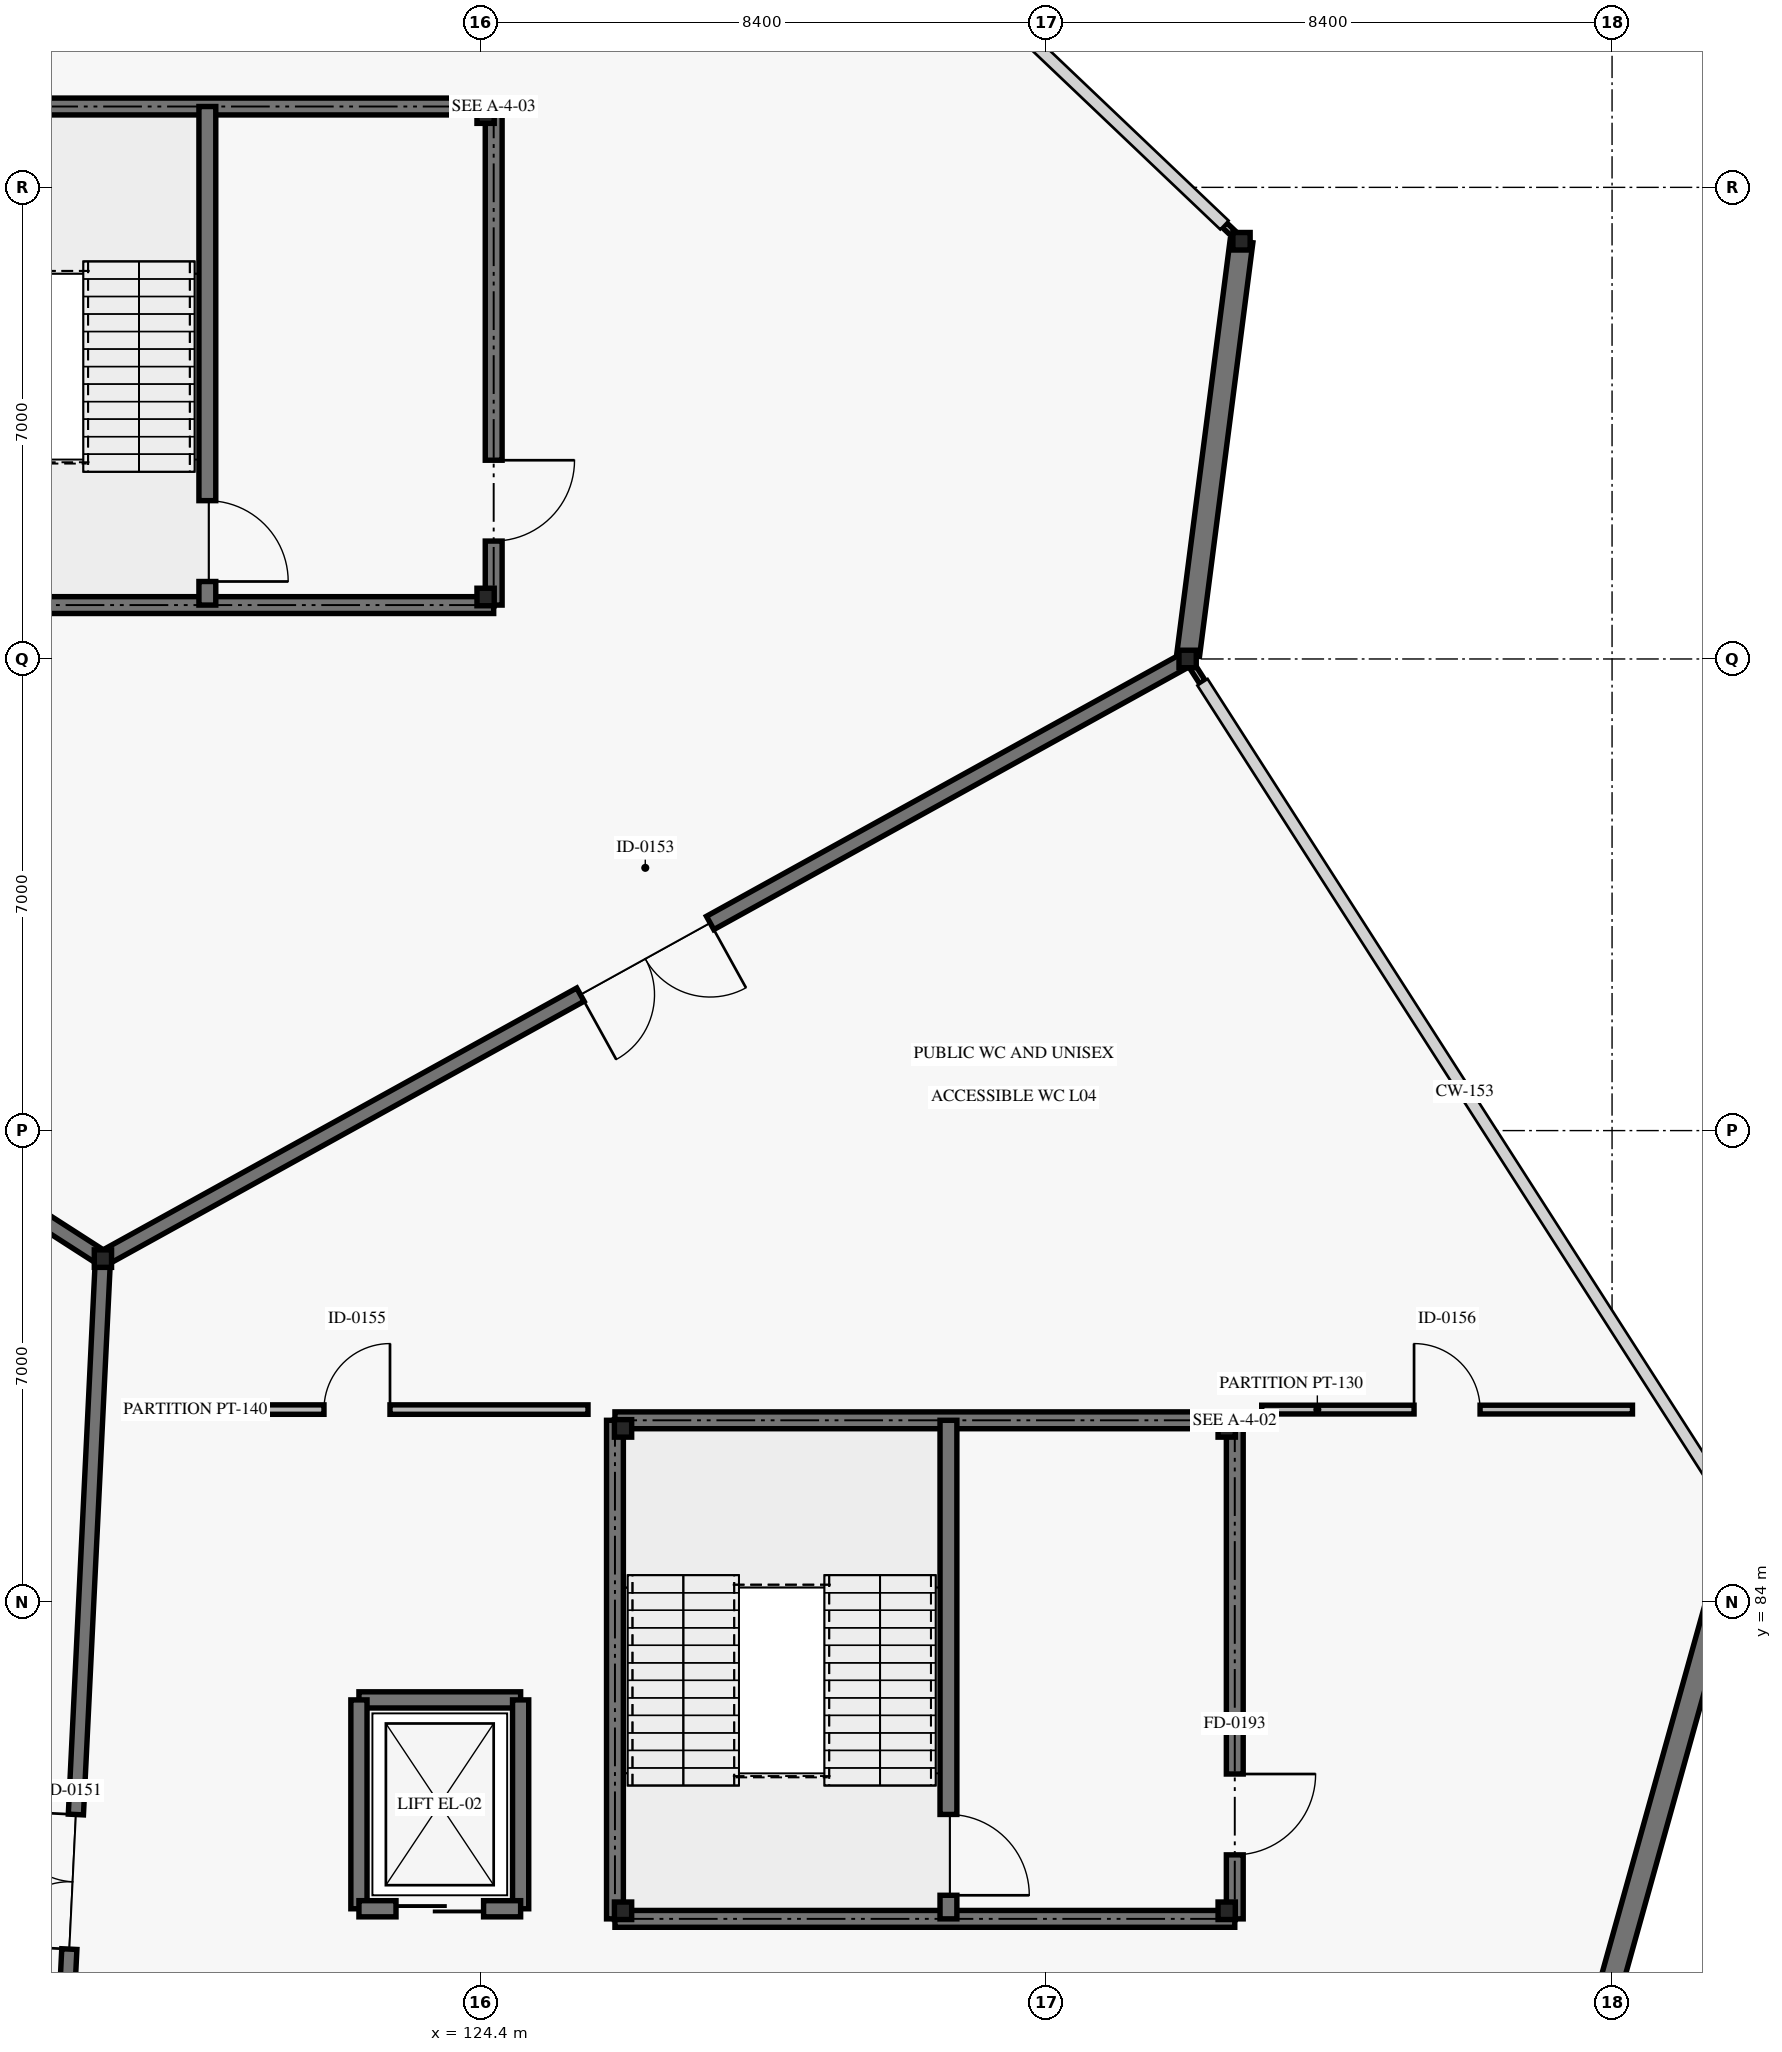
"""IFC4 building model, lengths in metres.
Left out: names, types, materials, properties, quantities, classifications, styles, units other than length and angle.
Written with IfcOpenShell. Run it as: python <this file> out.ifc"""

import sys

from ifc_helpers import new_model, si_unit, direction, frame, frame_2d, origin, origin_2d, place, context, subcontext, project, spatial, rectangle, i_section, extrude, element, fill, save


model = new_model("IFC4")
c1 = context("Model", 3, precision=1e-05, world=origin(), true_north=direction((0.0, 1.0)))
c2 = subcontext(c1, "Body", "Model", "MODEL_VIEW")
j1 = project(units=[si_unit("LENGTHUNIT", "METRE"), si_unit("PLANEANGLEUNIT", "RADIAN")], contexts=[c1])
p1 = place(None, origin())
s1 = spatial("IfcSite", under=j1, at=p1, CompositionType="ELEMENT")
p2 = place(p1, origin())
s2 = spatial("IfcBuilding", under=s1, at=p2, CompositionType="ELEMENT")
p3 = place(p2, frame((0.0, 0.0, 19.8)))
s3 = spatial("IfcBuildingStorey", under=s2, at=p3, CompositionType="ELEMENT", Elevation=19.8)
for number, where, z_axis, x_axis in (
    (1, (118.8, 89.1, 0.0), (0.0, 0.0, 1.0), (1.0, 0.0, 0.0)),
    (2, (134.9, 98.0, 0.0), (0.0, 0.0, 1.0), (1.0, 0.0, 0.0)),
    (3, (135.7, 104.2, 0.0), (0.0, 0.0, 1.0), (1.0, 0.0, 0.0)),
    (4, (126.52, 79.42, 0.0), (0.0, 0.0, 1.0), (1.0, 0.0, 0.0)),
    (5, (135.48, 79.42, 0.0), (0.0, 0.0, 1.0), (1.0, 0.0, 0.0)),
    (6, (135.48, 86.58, 0.0), (0.0, 0.0, 1.0), (1.0, 0.0, 0.0)),
    (7, (126.52, 86.58, 0.0), (0.0, 0.0, 1.0), (1.0, 0.0, 0.0)),
    (8, (124.48, 98.92, 0.0), (0.0, 0.0, 1.0), (1.0, 0.0, 0.0)),
    (9, (124.48, 106.08, 0.0), (0.0, 0.0, 1.0), (1.0, 0.0, 0.0)),
):
    element("IfcColumn", number, at=place(p3, frame(where, z_axis=z_axis, x_axis=x_axis)), inside=s3, PredefinedType="COLUMN", context=c2, shape_type="SweptSolid", body=[
        extrude(i_section(OverallWidth=0.256, OverallDepth=0.26, WebThickness=0.01, FlangeThickness=0.017, FilletRadius=0.013, at=origin_2d()), origin(), (0.0, 0.0, 1.0), 9.0),
    ])
p4 = place(p3, frame((143.1, 85.2, 0.0), z_axis=(0.0, 0.0, 1.0), x_axis=(-0.268807620494, -0.96319388659, 0.0)))
e10 = element("IfcWall", 10, at=p4, inside=s3, PredefinedType="SOLIDWALL", context=c2, shape_type="SweptSolid", body=[
    extrude(rectangle(XDim=13.393, YDim=0.34, at=frame_2d((6.696, 0.0))), origin(), (0.0, 0.0, 1.0), 7.82),
])
p5 = place(p3, frame((134.955, 97.915, 0.0), z_axis=(0.0, 0.0, 1.0), x_axis=(0.538155087301, -0.842845835258, 0.0)))
e11 = element("IfcWall", 11, at=p5, inside=s3, PredefinedType="SOLIDWALL", context=c2, shape_type="SweptSolid", body=[
    extrude(rectangle(XDim=0.309, YDim=0.095, at=frame_2d((0.154, 0.0))), origin(), (0.0, 0.0, 1.0), 7.82),
])
p6 = place(p3, frame((135.7, 104.2, 0.0), z_axis=(0.0, 0.0, 1.0), x_axis=(-0.127911284164, -0.99178561362, 0.0)))
e12 = element("IfcWall", 12, at=p6, inside=s3, PredefinedType="SOLIDWALL", context=c2, shape_type="SweptSolid", body=[
    extrude(rectangle(XDim=6.192, YDim=0.34, at=frame_2d((3.096, 0.0))), origin(), (0.0, 0.0, 1.0), 7.82),
])
p7 = place(p3, frame((135.446, 104.441, 0.0), z_axis=(0.0, 0.0, 1.0), x_axis=(0.726243974232, -0.687437044311, 0.0)))
e13 = element("IfcWall", 13, at=p7, inside=s3, PredefinedType="SOLIDWALL", context=c2, shape_type="SweptSolid", body=[
    extrude(rectangle(XDim=0.308, YDim=0.095, at=frame_2d((0.154, 0.0))), origin(), (0.0, 0.0, 1.0), 7.82),
])
p8 = place(p3, frame((117.9, 70.6, 0.0), z_axis=(0.0, 0.0, 1.0), x_axis=(0.048599072515, 0.998818366947, 0.0)))
e14 = element("IfcWall", 14, at=p8, inside=s3, PredefinedType="SOLIDWALL", context=c2, shape_type="SweptSolid", body=[
    extrude(rectangle(XDim=18.522, YDim=0.225, at=frame_2d((9.261, 0.0))), origin(), (0.0, 0.0, 1.0), 8.22),
])
p9 = place(p8, frame((8.261, 0.0, 0.0)))
e15 = element("IfcOpeningElement", 15, at=p9, cuts=e14, PredefinedType="OPENING", context=c2, shape_type="SweptSolid", body=[
    extrude(rectangle(XDim=2.0, YDim=2.5, at=frame_2d((1.0, 1.25))), frame((0.0, 0.123, 0.0), z_axis=(0.0, -1.0, 0.0), x_axis=(1.0, 0.0, 0.0)), (0.0, 0.0, 1.0), 0.245),
])
p10 = place(p3, frame((118.8, 89.1, 0.0), z_axis=(0.0, 0.0, 1.0), x_axis=(-0.841183241423, 0.540750177392, 0.0)))
e16 = element("IfcWall", 16, at=p10, inside=s3, PredefinedType="SOLIDWALL", context=c2, shape_type="SweptSolid", body=[
    extrude(rectangle(XDim=18.308, YDim=0.225, at=frame_2d((9.154, 0.0))), origin(), (0.0, 0.0, 1.0), 8.22),
])
p11 = place(p10, frame((8.229, 0.0, 0.0)))
e17 = element("IfcOpeningElement", 17, at=p11, cuts=e16, PredefinedType="OPENING", context=c2, shape_type="SweptSolid", body=[
    extrude(rectangle(XDim=1.85, YDim=2.4, at=frame_2d((0.925, 1.2))), frame((0.0, 0.123, 0.0), z_axis=(0.0, -1.0, 0.0), x_axis=(1.0, 0.0, 0.0)), (0.0, 0.0, 1.0), 0.245),
])
p12 = place(p3, frame((134.9, 98.0, 0.0), z_axis=(0.0, 0.0, 1.0), x_axis=(-0.875181353329, -0.483794996652, 0.0)))
e18 = element("IfcWall", 18, at=p12, inside=s3, PredefinedType="SOLIDWALL", context=c2, shape_type="SweptSolid", body=[
    extrude(rectangle(XDim=18.396, YDim=0.225, at=frame_2d((9.198, 0.0))), origin(), (0.0, 0.0, 1.0), 8.22),
])
p13 = place(p12, frame((8.098, 0.0, 0.0)))
e19 = element("IfcOpeningElement", 19, at=p13, cuts=e18, PredefinedType="OPENING", context=c2, shape_type="SweptSolid", body=[
    extrude(rectangle(XDim=2.2, YDim=2.6, at=frame_2d((1.1, 1.3))), frame((0.0, 0.123, 0.0), z_axis=(0.0, -1.0, 0.0), x_axis=(1.0, 0.0, 0.0)), (0.0, 0.0, 1.0), 0.245),
])
p14 = place(p3, frame((119.142, 86.859, 0.0), z_axis=(0.0, 0.0, 1.0), x_axis=(1.0, 0.0, 0.0)))
e20 = element("IfcWall", 20, at=p14, inside=s3, PredefinedType="PARTITIONING", context=c2, shape_type="SweptSolid", body=[
    extrude(rectangle(XDim=6.858, YDim=0.14, at=frame_2d((3.429, 0.0))), origin(), (0.0, 0.0, 1.0), 7.52),
])
p15 = place(p14, frame((2.939, 0.0, 0.0)))
e21 = element("IfcOpeningElement", 21, at=p15, cuts=e20, PredefinedType="OPENING", context=c2, shape_type="SweptSolid", body=[
    extrude(rectangle(XDim=0.98, YDim=2.15, at=frame_2d((0.49, 1.075))), frame((0.0, 0.08, 0.0), z_axis=(0.0, -1.0, 0.0), x_axis=(1.0, 0.0, 0.0)), (0.0, 0.0, 1.0), 0.16),
])
p16 = place(p3, frame((136.0, 86.859, 0.0), z_axis=(0.0, 0.0, 1.0), x_axis=(1.0, 0.0, 0.0)))
e22 = element("IfcWall", 22, at=p16, inside=s3, PredefinedType="PARTITIONING", context=c2, shape_type="SweptSolid", body=[
    extrude(rectangle(XDim=5.503, YDim=0.13, at=frame_2d((2.751, 0.0))), origin(), (0.0, 0.0, 1.0), 7.52),
])
p17 = place(p16, frame((2.261, 0.0, 0.0)))
e23 = element("IfcOpeningElement", 23, at=p17, cuts=e22, PredefinedType="OPENING", context=c2, shape_type="SweptSolid", body=[
    extrude(rectangle(XDim=0.98, YDim=2.15, at=frame_2d((0.49, 1.075))), frame((0.0, 0.075, 0.0), z_axis=(0.0, -1.0, 0.0), x_axis=(1.0, 0.0, 0.0)), (0.0, 0.0, 1.0), 0.15),
])
p18 = place(p3, frame((126.4, 79.3, 0.0), z_axis=(0.0, 0.0, 1.0), x_axis=(0.0, 1.0, 0.0)))
e24 = element("IfcWall", 24, at=p18, inside=s3, PredefinedType="SHEAR", context=c2, shape_type="SweptSolid", body=[
    extrude(rectangle(XDim=7.4, YDim=0.25, at=frame_2d((3.7, 0.0))), origin(), (0.0, 0.0, 1.0), 8.76),
])
for number, where, z_axis, x_axis in (
    (25, (126.4, 86.7, 0.0), (0.0, 0.0, 1.0), (1.0, 0.0, 0.0)),
    (26, (135.6, 79.3, 0.0), (0.0, 0.0, 1.0), (-1.0, 0.0, 0.0)),
):
    element("IfcWall", number, at=place(p3, frame(where, z_axis=z_axis, x_axis=x_axis)), inside=s3, PredefinedType="SHEAR", context=c2, shape_type="SweptSolid", body=[
        extrude(rectangle(XDim=9.2, YDim=0.25, at=frame_2d((4.6, 0.0))), origin(), (0.0, 0.0, 1.0), 8.76),
    ])
p19 = place(p3, frame((135.6, 86.7, 0.0), z_axis=(0.0, 0.0, 1.0), x_axis=(0.0, -1.0, 0.0)))
e27 = element("IfcWall", 27, at=p19, inside=s3, PredefinedType="SHEAR", context=c2, shape_type="SweptSolid", body=[
    extrude(rectangle(XDim=7.4, YDim=0.25, at=frame_2d((3.7, 0.0))), origin(), (0.0, 0.0, 1.0), 8.76),
])
p20 = place(p19, frame((5.25, 0.0, 0.0)))
e28 = element("IfcOpeningElement", 28, at=p20, cuts=e27, PredefinedType="OPENING", context=c2, shape_type="SweptSolid", body=[
    extrude(rectangle(XDim=1.2, YDim=2.2, at=frame_2d((0.6, 1.1))), frame((0.0, 0.135, 0.0), z_axis=(0.0, -1.0, 0.0), x_axis=(1.0, 0.0, 0.0)), (0.0, 0.0, 1.0), 0.27),
])
p21 = place(p3, frame((131.35, 86.7, 0.0), z_axis=(0.0, 0.0, 1.0), x_axis=(0.0, -1.0, 0.0)))
e29 = element("IfcWall", 29, at=p21, inside=s3, PredefinedType="SHEAR", context=c2, shape_type="SweptSolid", body=[
    extrude(rectangle(XDim=7.4, YDim=0.25, at=frame_2d((3.7, 0.0))), origin(), (0.0, 0.0, 1.0), 8.76),
])
p22 = place(p21, frame((5.85, 0.0, 0.0)))
e30 = element("IfcOpeningElement", 30, at=p22, cuts=e29, PredefinedType="OPENING", context=c2, shape_type="SweptSolid", body=[
    extrude(rectangle(XDim=1.2, YDim=2.2, at=frame_2d((0.6, 1.1))), frame((0.0, 0.135, 0.0), z_axis=(0.0, -1.0, 0.0), x_axis=(1.0, 0.0, 0.0)), (0.0, 0.0, 1.0), 0.27),
])
for number, where, z_axis, x_axis in (
    (31, (115.4, 106.2, 0.0), (0.0, 0.0, 1.0), (1.0, 0.0, 0.0)),
    (32, (124.6, 98.8, 0.0), (0.0, 0.0, 1.0), (-1.0, 0.0, 0.0)),
):
    element("IfcWall", number, at=place(p3, frame(where, z_axis=z_axis, x_axis=x_axis)), inside=s3, PredefinedType="SHEAR", context=c2, shape_type="SweptSolid", body=[
        extrude(rectangle(XDim=9.2, YDim=0.25, at=frame_2d((4.6, 0.0))), origin(), (0.0, 0.0, 1.0), 8.76),
    ])
p23 = place(p3, frame((124.6, 106.2, 0.0), z_axis=(0.0, 0.0, 1.0), x_axis=(0.0, -1.0, 0.0)))
e33 = element("IfcWall", 33, at=p23, inside=s3, PredefinedType="SHEAR", context=c2, shape_type="SweptSolid", body=[
    extrude(rectangle(XDim=7.4, YDim=0.25, at=frame_2d((3.7, 0.0))), origin(), (0.0, 0.0, 1.0), 8.76),
])
p24 = place(p23, frame((5.25, 0.0, 0.0)))
e34 = element("IfcOpeningElement", 34, at=p24, cuts=e33, PredefinedType="OPENING", context=c2, shape_type="SweptSolid", body=[
    extrude(rectangle(XDim=1.2, YDim=2.2, at=frame_2d((0.6, 1.1))), frame((0.0, 0.135, 0.0), z_axis=(0.0, -1.0, 0.0), x_axis=(1.0, 0.0, 0.0)), (0.0, 0.0, 1.0), 0.27),
])
p25 = place(p3, frame((120.35, 106.2, 0.0), z_axis=(0.0, 0.0, 1.0), x_axis=(0.0, -1.0, 0.0)))
e35 = element("IfcWall", 35, at=p25, inside=s3, PredefinedType="SHEAR", context=c2, shape_type="SweptSolid", body=[
    extrude(rectangle(XDim=7.4, YDim=0.25, at=frame_2d((3.7, 0.0))), origin(), (0.0, 0.0, 1.0), 8.76),
])
p26 = place(p25, frame((5.85, 0.0, 0.0)))
e36 = element("IfcOpeningElement", 36, at=p26, cuts=e35, PredefinedType="OPENING", context=c2, shape_type="SweptSolid", body=[
    extrude(rectangle(XDim=1.2, YDim=2.2, at=frame_2d((0.6, 1.1))), frame((0.0, 0.135, 0.0), z_axis=(0.0, -1.0, 0.0), x_axis=(1.0, 0.0, 0.0)), (0.0, 0.0, 1.0), 0.27),
])
p27 = place(p3, frame((122.6, 82.55, 0.0), z_axis=(0.0, 0.0, 1.0), x_axis=(1.0, 0.0, 0.0)))
e37 = element("IfcWall", 37, at=p27, inside=s3, PredefinedType="SHEAR", context=c2, shape_type="SweptSolid", body=[
    extrude(rectangle(XDim=2.4, YDim=0.24, at=frame_2d((1.2, 0.0))), origin(), (0.0, 0.0, 1.0), 8.76),
])
for number, where, z_axis, x_axis in (
    (38, (125.0, 82.55, 0.0), (0.0, 0.0, 1.0), (0.0, -1.0, 0.0)),
    (39, (122.6, 79.45, 0.0), (0.0, 0.0, 1.0), (0.0, 1.0, 0.0)),
):
    element("IfcWall", number, at=place(p3, frame(where, z_axis=z_axis, x_axis=x_axis)), inside=s3, PredefinedType="SHEAR", context=c2, shape_type="SweptSolid", body=[
        extrude(rectangle(XDim=3.1, YDim=0.24, at=frame_2d((1.55, 0.0))), origin(), (0.0, 0.0, 1.0), 8.76),
    ])
p28 = place(p3, frame((125.0, 79.45, 0.0), z_axis=(0.0, 0.0, 1.0), x_axis=(-1.0, 0.0, 0.0)))
e40 = element("IfcWall", 40, at=p28, inside=s3, PredefinedType="SHEAR", context=c2, shape_type="SweptSolid", body=[
    extrude(rectangle(XDim=2.4, YDim=0.24, at=frame_2d((1.2, 0.0))), origin(), (0.0, 0.0, 1.0), 8.76),
])
p29 = place(p28, frame((0.55, 0.0, 0.0)))
e41 = element("IfcOpeningElement", 41, at=p29, cuts=e40, PredefinedType="OPENING", context=c2, shape_type="SweptSolid", body=[
    extrude(rectangle(XDim=1.3, YDim=2.25, at=frame_2d((0.65, 1.125))), frame((0.0, 0.13, 0.0), z_axis=(0.0, -1.0, 0.0), x_axis=(1.0, 0.0, 0.0)), (0.0, 0.0, 1.0), 0.26),
])
p30 = place(p9, origin())
e42 = element("IfcDoor", 42, at=p30, inside=s3, OperationType="DOUBLE_DOOR_SINGLE_SWING", PredefinedType="DOOR", context=c2, shape_type="SweptSolid", body=[
    extrude(rectangle(XDim=2.0, YDim=2.5, at=frame_2d((1.0, 1.25))), frame((0.0, 0.025, 0.0), z_axis=(0.0, -1.0, 0.0), x_axis=(1.0, 0.0, 0.0)), (0.0, 0.0, 1.0), 0.05),
])
fill(e15, e42)
p31 = place(p13, origin())
e43 = element("IfcDoor", 43, at=p31, inside=s3, OperationType="DOUBLE_DOOR_SINGLE_SWING", PredefinedType="DOOR", context=c2, shape_type="SweptSolid", body=[
    extrude(rectangle(XDim=2.2, YDim=2.6, at=frame_2d((1.1, 1.3))), frame((0.0, 0.025, 0.0), z_axis=(0.0, -1.0, 0.0), x_axis=(1.0, 0.0, 0.0)), (0.0, 0.0, 1.0), 0.05),
])
fill(e19, e43)
p32 = place(p15, origin())
e44 = element("IfcDoor", 44, at=p32, inside=s3, OperationType="SINGLE_SWING_RIGHT", PredefinedType="DOOR", context=c2, shape_type="SweptSolid", body=[
    extrude(rectangle(XDim=0.98, YDim=2.15, at=frame_2d((0.49, 1.075))), frame((0.0, 0.025, 0.0), z_axis=(0.0, -1.0, 0.0), x_axis=(1.0, 0.0, 0.0)), (0.0, 0.0, 1.0), 0.05),
])
fill(e21, e44)
p33 = place(p17, origin())
e45 = element("IfcDoor", 45, at=p33, inside=s3, OperationType="SINGLE_SWING_LEFT", PredefinedType="DOOR", context=c2, shape_type="SweptSolid", body=[
    extrude(rectangle(XDim=0.98, YDim=2.15, at=frame_2d((0.49, 1.075))), frame((0.0, 0.025, 0.0), z_axis=(0.0, -1.0, 0.0), x_axis=(1.0, 0.0, 0.0)), (0.0, 0.0, 1.0), 0.05),
])
fill(e23, e45)
p34 = place(p20, origin())
e46 = element("IfcDoor", 46, at=p34, inside=s3, OperationType="SINGLE_SWING_LEFT", PredefinedType="DOOR", context=c2, shape_type="SweptSolid", body=[
    extrude(rectangle(XDim=1.2, YDim=2.2, at=frame_2d((0.6, 1.1))), frame((0.0, 0.025, 0.0), z_axis=(0.0, -1.0, 0.0), x_axis=(1.0, 0.0, 0.0)), (0.0, 0.0, 1.0), 0.05),
])
fill(e28, e46)
p35 = place(p22, origin())
e47 = element("IfcDoor", 47, at=p35, inside=s3, OperationType="SINGLE_SWING_RIGHT", PredefinedType="DOOR", context=c2, shape_type="SweptSolid", body=[
    extrude(rectangle(XDim=1.2, YDim=2.2, at=frame_2d((0.6, 1.1))), frame((0.0, 0.025, 0.0), z_axis=(0.0, -1.0, 0.0), x_axis=(1.0, 0.0, 0.0)), (0.0, 0.0, 1.0), 0.05),
])
fill(e30, e47)
p36 = place(p24, origin())
e48 = element("IfcDoor", 48, at=p36, inside=s3, OperationType="SINGLE_SWING_LEFT", PredefinedType="DOOR", context=c2, shape_type="SweptSolid", body=[
    extrude(rectangle(XDim=1.2, YDim=2.2, at=frame_2d((0.6, 1.1))), frame((0.0, 0.025, 0.0), z_axis=(0.0, -1.0, 0.0), x_axis=(1.0, 0.0, 0.0)), (0.0, 0.0, 1.0), 0.05),
])
fill(e34, e48)
p37 = place(p26, origin())
e49 = element("IfcDoor", 49, at=p37, inside=s3, OperationType="SINGLE_SWING_RIGHT", PredefinedType="DOOR", context=c2, shape_type="SweptSolid", body=[
    extrude(rectangle(XDim=1.2, YDim=2.2, at=frame_2d((0.6, 1.1))), frame((0.0, 0.025, 0.0), z_axis=(0.0, -1.0, 0.0), x_axis=(1.0, 0.0, 0.0)), (0.0, 0.0, 1.0), 0.05),
])
fill(e36, e49)
p38 = place(p29, origin())
e50 = element("IfcDoor", 50, at=p38, inside=s3, OperationType="SLIDING_TO_LEFT", PredefinedType="DOOR", context=c2, shape_type="SweptSolid", body=[
    extrude(rectangle(XDim=1.3, YDim=2.25, at=frame_2d((0.65, 1.125))), frame((0.0, 0.025, 0.0), z_axis=(0.0, -1.0, 0.0), x_axis=(1.0, 0.0, 0.0)), (0.0, 0.0, 1.0), 0.05),
])
fill(e41, e50)
save(model, sys.argv[1])
